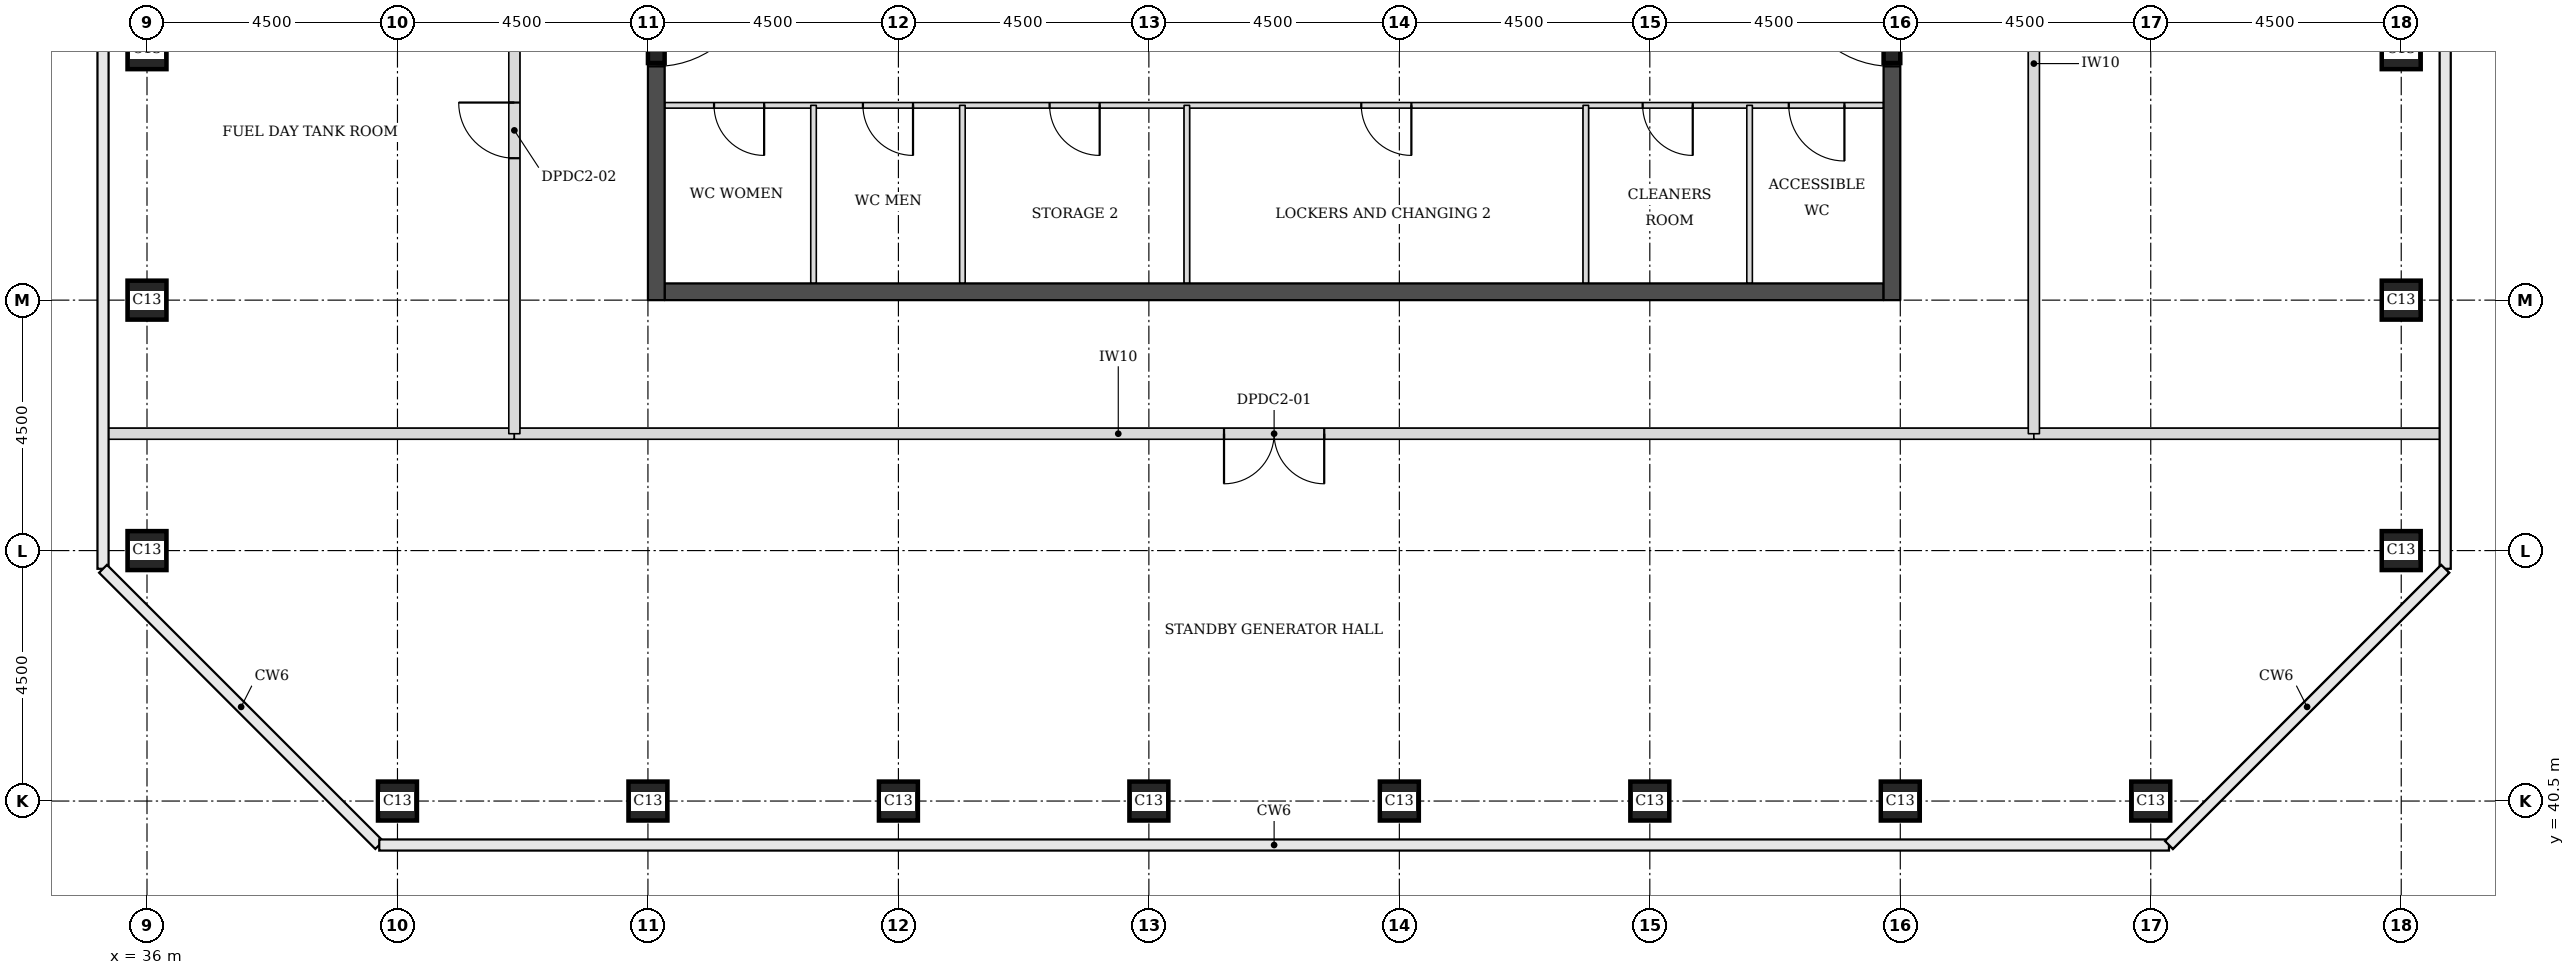
"""IFC4 building model, lengths in metres.
Left out: names, types, materials, properties, quantities, classifications, styles, units other than length and angle.
Written with IfcOpenShell. Run it as: python <this file> out.ifc"""

import sys

from ifc_helpers import new_model, si_unit, direction, frame, frame_2d, origin, origin_2d, place, context, subcontext, project, spatial, rectangle, extrude, element, fill, save


model = new_model("IFC4")
c1 = context("Model", 3, precision=1e-05, world=origin(), true_north=direction((0.0, 1.0)))
c2 = subcontext(c1, "Body", "Model", "MODEL_VIEW")
j1 = project(units=[si_unit("LENGTHUNIT", "METRE"), si_unit("PLANEANGLEUNIT", "RADIAN")], contexts=[c1])
p1 = place(None, origin())
s1 = spatial("IfcSite", under=j1, at=p1, CompositionType="ELEMENT")
p2 = place(p1, origin())
s2 = spatial("IfcBuilding", under=s1, at=p2, CompositionType="ELEMENT")
p3 = place(p2, frame((0.0, 0.0, 268.7)))
s3 = spatial("IfcBuildingStorey", under=s2, at=p3, CompositionType="ELEMENT", Elevation=268.7)
for number, where, z_axis, x_axis in (
    (1, (40.5, 40.5, 0.0), (0.0, 0.0, 1.0), (1.0, 0.0, 0.0)),
    (2, (45.0, 40.5, 0.0), (0.0, 0.0, 1.0), (1.0, 0.0, 0.0)),
    (3, (49.5, 40.5, 0.0), (0.0, 0.0, 1.0), (1.0, 0.0, 0.0)),
    (4, (54.0, 40.5, 0.0), (0.0, 0.0, 1.0), (1.0, 0.0, 0.0)),
    (5, (58.5, 40.5, 0.0), (0.0, 0.0, 1.0), (1.0, 0.0, 0.0)),
    (6, (63.0, 40.5, 0.0), (0.0, 0.0, 1.0), (1.0, 0.0, 0.0)),
    (7, (67.5, 40.5, 0.0), (0.0, 0.0, 1.0), (1.0, 0.0, 0.0)),
    (8, (72.0, 40.5, 0.0), (0.0, 0.0, 1.0), (1.0, 0.0, 0.0)),
    (9, (36.0, 45.0, 0.0), (0.0, 0.0, 1.0), (1.0, 0.0, 0.0)),
    (10, (76.5, 45.0, 0.0), (0.0, 0.0, 1.0), (1.0, 0.0, 0.0)),
    (11, (36.0, 49.5, 0.0), (0.0, 0.0, 1.0), (1.0, 0.0, 0.0)),
    (12, (76.5, 49.5, 0.0), (0.0, 0.0, 1.0), (1.0, 0.0, 0.0)),
    (13, (36.0, 54.0, 0.0), (0.0, 0.0, 1.0), (1.0, 0.0, 0.0)),
    (14, (76.5, 54.0, 0.0), (0.0, 0.0, 1.0), (1.0, 0.0, 0.0)),
):
    element("IfcColumn", number, at=place(p3, frame(where, z_axis=z_axis, x_axis=x_axis)), inside=s3, PredefinedType="COLUMN", context=c2, shape_type="SweptSolid", body=[
        extrude(rectangle(XDim=0.7, YDim=0.7, at=origin_2d()), origin(), (0.0, 0.0, 1.0), 5.0),
    ])
p4 = place(p3, frame((45.3, 49.65, 0.0), z_axis=(0.0, 0.0, 1.0), x_axis=(1.0, 0.0, 0.0)))
e15 = element("IfcWall", 15, at=p4, inside=s3, PredefinedType="SHEAR", context=c2, shape_type="SweptSolid", body=[
    extrude(rectangle(XDim=21.9, YDim=0.3, at=frame_2d((10.95, 0.0))), origin(), (0.0, 0.0, 1.0), 5.0),
])
p5 = place(p3, frame((45.15, 49.5, 0.0), z_axis=(0.0, 0.0, 1.0), x_axis=(0.0, 1.0, 0.0)))
e16 = element("IfcWall", 16, at=p5, inside=s3, PredefinedType="SHEAR", context=c2, shape_type="SweptSolid", body=[
    extrude(rectangle(XDim=22.5, YDim=0.3, at=frame_2d((11.25, 0.0))), origin(), (0.0, 0.0, 1.0), 5.0),
])
p6 = place(p5, frame((4.2, 0.0, 0.0)))
e17 = element("IfcOpeningElement", 17, at=p6, cuts=e16, PredefinedType="OPENING", context=c2, shape_type="SweptSolid", body=[
    extrude(rectangle(XDim=1.8, YDim=2.1, at=frame_2d((0.9, 1.05))), frame((0.0, 0.16, 0.0), z_axis=(0.0, -1.0, 0.0), x_axis=(1.0, 0.0, 0.0)), (0.0, 0.0, 1.0), 0.32),
])
p7 = place(p5, frame((6.9, 0.0, 0.0)))
e18 = element("IfcOpeningElement", 18, at=p7, cuts=e16, PredefinedType="OPENING", context=c2, shape_type="SweptSolid", body=[
    extrude(rectangle(XDim=1.1, YDim=2.1, at=frame_2d((0.55, 1.05))), frame((0.0, 0.16, 0.0), z_axis=(0.0, -1.0, 0.0), x_axis=(1.0, 0.0, 0.0)), (0.0, 0.0, 1.0), 0.32),
])
p8 = place(p5, frame((13.6, 0.0, 0.0)))
e19 = element("IfcOpeningElement", 19, at=p8, cuts=e16, PredefinedType="OPENING", context=c2, shape_type="SweptSolid", body=[
    extrude(rectangle(XDim=1.1, YDim=2.1, at=frame_2d((0.55, 1.05))), frame((0.0, 0.16, 0.0), z_axis=(0.0, -1.0, 0.0), x_axis=(1.0, 0.0, 0.0)), (0.0, 0.0, 1.0), 0.32),
])
p9 = place(p5, frame((16.5, 0.0, 0.0)))
e20 = element("IfcOpeningElement", 20, at=p9, cuts=e16, PredefinedType="OPENING", context=c2, shape_type="SweptSolid", body=[
    extrude(rectangle(XDim=1.8, YDim=2.1, at=frame_2d((0.9, 1.05))), frame((0.0, 0.16, 0.0), z_axis=(0.0, -1.0, 0.0), x_axis=(1.0, 0.0, 0.0)), (0.0, 0.0, 1.0), 0.32),
])
p10 = place(p3, frame((67.35, 49.5, 0.0), z_axis=(0.0, 0.0, 1.0), x_axis=(0.0, 1.0, 0.0)))
e21 = element("IfcWall", 21, at=p10, inside=s3, PredefinedType="SHEAR", context=c2, shape_type="SweptSolid", body=[
    extrude(rectangle(XDim=22.5, YDim=0.3, at=frame_2d((11.25, 0.0))), origin(), (0.0, 0.0, 1.0), 5.0),
])
p11 = place(p10, frame((4.2, 0.0, 0.0)))
e22 = element("IfcOpeningElement", 22, at=p11, cuts=e21, PredefinedType="OPENING", context=c2, shape_type="SweptSolid", body=[
    extrude(rectangle(XDim=1.8, YDim=2.1, at=frame_2d((0.9, 1.05))), frame((0.0, 0.16, 0.0), z_axis=(0.0, -1.0, 0.0), x_axis=(1.0, 0.0, 0.0)), (0.0, 0.0, 1.0), 0.32),
])
p12 = place(p10, frame((6.9, 0.0, 0.0)))
e23 = element("IfcOpeningElement", 23, at=p12, cuts=e21, PredefinedType="OPENING", context=c2, shape_type="SweptSolid", body=[
    extrude(rectangle(XDim=1.1, YDim=2.1, at=frame_2d((0.55, 1.05))), frame((0.0, 0.16, 0.0), z_axis=(0.0, -1.0, 0.0), x_axis=(1.0, 0.0, 0.0)), (0.0, 0.0, 1.0), 0.32),
])
p13 = place(p10, frame((13.6, 0.0, 0.0)))
e24 = element("IfcOpeningElement", 24, at=p13, cuts=e21, PredefinedType="OPENING", context=c2, shape_type="SweptSolid", body=[
    extrude(rectangle(XDim=1.1, YDim=2.1, at=frame_2d((0.55, 1.05))), frame((0.0, 0.16, 0.0), z_axis=(0.0, -1.0, 0.0), x_axis=(1.0, 0.0, 0.0)), (0.0, 0.0, 1.0), 0.32),
])
p14 = place(p10, frame((16.5, 0.0, 0.0)))
e25 = element("IfcOpeningElement", 25, at=p14, cuts=e21, PredefinedType="OPENING", context=c2, shape_type="SweptSolid", body=[
    extrude(rectangle(XDim=1.8, YDim=2.1, at=frame_2d((0.9, 1.05))), frame((0.0, 0.16, 0.0), z_axis=(0.0, -1.0, 0.0), x_axis=(1.0, 0.0, 0.0)), (0.0, 0.0, 1.0), 0.32),
])
p15 = place(p3, frame((35.3, 47.1, 0.0), z_axis=(0.0, 0.0, 1.0), x_axis=(1.0, 0.0, 0.0)))
e26 = element("IfcWall", 26, at=p15, inside=s3, PredefinedType="PARTITIONING", context=c2, shape_type="SweptSolid", body=[
    extrude(rectangle(XDim=7.3, YDim=0.2, at=frame_2d((3.65, 0.0))), origin(), (0.0, 0.0, 1.0), 4.75),
])
p16 = place(p3, frame((42.6, 47.1, 0.0), z_axis=(0.0, 0.0, 1.0), x_axis=(1.0, 0.0, 0.0)))
e27 = element("IfcWall", 27, at=p16, inside=s3, PredefinedType="PARTITIONING", context=c2, shape_type="SweptSolid", body=[
    extrude(rectangle(XDim=27.3, YDim=0.2, at=frame_2d((13.65, 0.0))), origin(), (0.0, 0.0, 1.0), 4.75),
])
p17 = place(p16, frame((12.75, 0.0, 0.0)))
e28 = element("IfcOpeningElement", 28, at=p17, cuts=e27, PredefinedType="OPENING", context=c2, shape_type="SweptSolid", body=[
    extrude(rectangle(XDim=1.8, YDim=2.1, at=frame_2d((0.9, 1.05))), frame((0.0, 0.11, 0.0), z_axis=(0.0, -1.0, 0.0), x_axis=(1.0, 0.0, 0.0)), (0.0, 0.0, 1.0), 0.22),
])
p18 = place(p3, frame((42.6, 47.1, 0.0), z_axis=(0.0, 0.0, 1.0), x_axis=(0.0, 1.0, 0.0)))
e29 = element("IfcWall", 29, at=p18, inside=s3, PredefinedType="PARTITIONING", context=c2, shape_type="SweptSolid", body=[
    extrude(rectangle(XDim=10.9, YDim=0.2, at=frame_2d((5.45, 0.0))), origin(), (0.0, 0.0, 1.0), 4.75),
])
p19 = place(p18, frame((4.95, 0.0, 0.0)))
e30 = element("IfcOpeningElement", 30, at=p19, cuts=e29, PredefinedType="OPENING", context=c2, shape_type="SweptSolid", body=[
    extrude(rectangle(XDim=1.0, YDim=2.1, at=frame_2d((0.5, 1.05))), frame((0.0, 0.11, 0.0), z_axis=(0.0, -1.0, 0.0), x_axis=(1.0, 0.0, 0.0)), (0.0, 0.0, 1.0), 0.22),
])
p20 = place(p3, frame((69.9, 47.1, 0.0), z_axis=(0.0, 0.0, 1.0), x_axis=(1.0, 0.0, 0.0)))
e31 = element("IfcWall", 31, at=p20, inside=s3, PredefinedType="PARTITIONING", context=c2, shape_type="SweptSolid", body=[
    extrude(rectangle(XDim=7.3, YDim=0.2, at=frame_2d((3.65, 0.0))), origin(), (0.0, 0.0, 1.0), 4.75),
])
p21 = place(p3, frame((69.9, 47.1, 0.0), z_axis=(0.0, 0.0, 1.0), x_axis=(0.0, 1.0, 0.0)))
e32 = element("IfcWall", 32, at=p21, inside=s3, PredefinedType="PARTITIONING", context=c2, shape_type="SweptSolid", body=[
    extrude(rectangle(XDim=18.9, YDim=0.2, at=frame_2d((9.45, 0.0))), origin(), (0.0, 0.0, 1.0), 4.75),
])
p22 = place(p21, frame((8.55, 0.0, 0.0)))
e33 = element("IfcOpeningElement", 33, at=p22, cuts=e32, PredefinedType="OPENING", context=c2, shape_type="SweptSolid", body=[
    extrude(rectangle(XDim=1.8, YDim=2.1, at=frame_2d((0.9, 1.05))), frame((0.0, 0.11, 0.0), z_axis=(0.0, -1.0, 0.0), x_axis=(1.0, 0.0, 0.0)), (0.0, 0.0, 1.0), 0.22),
])
p23 = place(p3, frame((45.3, 53.0, 0.0), z_axis=(0.0, 0.0, 1.0), x_axis=(1.0, 0.0, 0.0)))
e34 = element("IfcWall", 34, at=p23, inside=s3, PredefinedType="PARTITIONING", context=c2, shape_type="SweptSolid", body=[
    extrude(rectangle(XDim=21.9, YDim=0.1, at=frame_2d((10.95, 0.0))), origin(), (0.0, 0.0, 1.0), 4.75),
])
p24 = place(p23, frame((20.196, 0.0, 0.0)))
e35 = element("IfcOpeningElement", 35, at=p24, cuts=e34, PredefinedType="OPENING", context=c2, shape_type="SweptSolid", body=[
    extrude(rectangle(XDim=1.0, YDim=2.1, at=frame_2d((0.5, 1.05))), frame((0.0, 0.06, 0.0), z_axis=(0.0, -1.0, 0.0), x_axis=(1.0, 0.0, 0.0)), (0.0, 0.0, 1.0), 0.12),
])
p25 = place(p23, frame((17.571, 0.0, 0.0)))
e36 = element("IfcOpeningElement", 36, at=p25, cuts=e34, PredefinedType="OPENING", context=c2, shape_type="SweptSolid", body=[
    extrude(rectangle(XDim=0.9, YDim=2.1, at=frame_2d((0.45, 1.05))), frame((0.0, 0.06, 0.0), z_axis=(0.0, -1.0, 0.0), x_axis=(1.0, 0.0, 0.0)), (0.0, 0.0, 1.0), 0.12),
])
p26 = place(p23, frame((0.887, 0.0, 0.0)))
e37 = element("IfcOpeningElement", 37, at=p26, cuts=e34, PredefinedType="OPENING", context=c2, shape_type="SweptSolid", body=[
    extrude(rectangle(XDim=0.9, YDim=2.1, at=frame_2d((0.45, 1.05))), frame((0.0, 0.06, 0.0), z_axis=(0.0, -1.0, 0.0), x_axis=(1.0, 0.0, 0.0)), (0.0, 0.0, 1.0), 0.12),
])
p27 = place(p23, frame((3.562, 0.0, 0.0)))
e38 = element("IfcOpeningElement", 38, at=p27, cuts=e34, PredefinedType="OPENING", context=c2, shape_type="SweptSolid", body=[
    extrude(rectangle(XDim=0.9, YDim=2.1, at=frame_2d((0.45, 1.05))), frame((0.0, 0.06, 0.0), z_axis=(0.0, -1.0, 0.0), x_axis=(1.0, 0.0, 0.0)), (0.0, 0.0, 1.0), 0.12),
])
p28 = place(p23, frame((6.916, 0.0, 0.0)))
e39 = element("IfcOpeningElement", 39, at=p28, cuts=e34, PredefinedType="OPENING", context=c2, shape_type="SweptSolid", body=[
    extrude(rectangle(XDim=0.9, YDim=2.1, at=frame_2d((0.45, 1.05))), frame((0.0, 0.06, 0.0), z_axis=(0.0, -1.0, 0.0), x_axis=(1.0, 0.0, 0.0)), (0.0, 0.0, 1.0), 0.12),
])
p29 = place(p23, frame((12.516, 0.0, 0.0)))
e40 = element("IfcOpeningElement", 40, at=p29, cuts=e34, PredefinedType="OPENING", context=c2, shape_type="SweptSolid", body=[
    extrude(rectangle(XDim=0.9, YDim=2.1, at=frame_2d((0.45, 1.05))), frame((0.0, 0.06, 0.0), z_axis=(0.0, -1.0, 0.0), x_axis=(1.0, 0.0, 0.0)), (0.0, 0.0, 1.0), 0.12),
])
for number, where, z_axis, x_axis in (
    (41, (47.975, 49.8, 0.0), (0.0, 0.0, 1.0), (0.0, 1.0, 0.0)),
    (42, (50.65, 49.8, 0.0), (0.0, 0.0, 1.0), (0.0, 1.0, 0.0)),
    (43, (54.682, 49.8, 0.0), (0.0, 0.0, 1.0), (0.0, 1.0, 0.0)),
    (44, (61.85, 49.8, 0.0), (0.0, 0.0, 1.0), (0.0, 1.0, 0.0)),
    (45, (64.792, 49.8, 0.0), (0.0, 0.0, 1.0), (0.0, 1.0, 0.0)),
):
    element("IfcWall", number, at=place(p3, frame(where, z_axis=z_axis, x_axis=x_axis)), inside=s3, PredefinedType="PARTITIONING", context=c2, shape_type="SweptSolid", body=[
        extrude(rectangle(XDim=3.2, YDim=0.1, at=frame_2d((1.6, 0.0))), origin(), (0.0, 0.0, 1.0), 4.75),
    ])
p30 = place(p17, frame((1.8, 0.0, 0.0), z_axis=(0.0, 0.0, 1.0), x_axis=(-1.0, 0.0, 0.0)))
e46 = element("IfcDoor", 46, at=p30, inside=s3, OperationType="DOUBLE_DOOR_SINGLE_SWING", PredefinedType="DOOR", context=c2, shape_type="SweptSolid", body=[
    extrude(rectangle(XDim=1.8, YDim=2.1, at=frame_2d((0.9, 1.05))), frame((0.0, 0.025, 0.0), z_axis=(0.0, -1.0, 0.0), x_axis=(1.0, 0.0, 0.0)), (0.0, 0.0, 1.0), 0.05),
])
fill(e28, e46)
p31 = place(p19, origin())
e47 = element("IfcDoor", 47, at=p31, inside=s3, OperationType="SINGLE_SWING_RIGHT", PredefinedType="DOOR", context=c2, shape_type="SweptSolid", body=[
    extrude(rectangle(XDim=1.0, YDim=2.1, at=frame_2d((0.5, 1.05))), frame((0.0, 0.025, 0.0), z_axis=(0.0, -1.0, 0.0), x_axis=(1.0, 0.0, 0.0)), (0.0, 0.0, 1.0), 0.05),
])
fill(e30, e47)
p32 = place(p6, frame((1.8, 0.0, 0.0), z_axis=(0.0, 0.0, 1.0), x_axis=(-1.0, 0.0, 0.0)))
e48 = element("IfcDoor", 48, at=p32, inside=s3, OperationType="SINGLE_SWING_LEFT", PredefinedType="DOOR", context=c2, shape_type="SweptSolid", body=[
    extrude(rectangle(XDim=1.8, YDim=2.1, at=frame_2d((0.9, 1.05))), frame((0.0, 0.025, 0.0), z_axis=(0.0, -1.0, 0.0), x_axis=(1.0, 0.0, 0.0)), (0.0, 0.0, 1.0), 0.05),
])
fill(e17, e48)
p33 = place(p11, origin())
e49 = element("IfcDoor", 49, at=p33, inside=s3, OperationType="SINGLE_SWING_RIGHT", PredefinedType="DOOR", context=c2, shape_type="SweptSolid", body=[
    extrude(rectangle(XDim=1.8, YDim=2.1, at=frame_2d((0.9, 1.05))), frame((0.0, 0.025, 0.0), z_axis=(0.0, -1.0, 0.0), x_axis=(1.0, 0.0, 0.0)), (0.0, 0.0, 1.0), 0.05),
])
fill(e22, e49)
p34 = place(p24, frame((1.0, 0.0, 0.0), z_axis=(0.0, 0.0, 1.0), x_axis=(-1.0, 0.0, 0.0)))
e50 = element("IfcDoor", 50, at=p34, inside=s3, OperationType="SINGLE_SWING_LEFT", PredefinedType="DOOR", context=c2, shape_type="SweptSolid", body=[
    extrude(rectangle(XDim=1.0, YDim=2.1, at=frame_2d((0.5, 1.05))), frame((0.0, 0.025, 0.0), z_axis=(0.0, -1.0, 0.0), x_axis=(1.0, 0.0, 0.0)), (0.0, 0.0, 1.0), 0.05),
])
fill(e35, e50)
p35 = place(p25, frame((0.9, 0.0, 0.0), z_axis=(0.0, 0.0, 1.0), x_axis=(-1.0, 0.0, 0.0)))
e51 = element("IfcDoor", 51, at=p35, inside=s3, OperationType="SINGLE_SWING_LEFT", PredefinedType="DOOR", context=c2, shape_type="SweptSolid", body=[
    extrude(rectangle(XDim=0.9, YDim=2.1, at=frame_2d((0.45, 1.05))), frame((0.0, 0.025, 0.0), z_axis=(0.0, -1.0, 0.0), x_axis=(1.0, 0.0, 0.0)), (0.0, 0.0, 1.0), 0.05),
])
fill(e36, e51)
p36 = place(p26, frame((0.9, 0.0, 0.0), z_axis=(0.0, 0.0, 1.0), x_axis=(-1.0, 0.0, 0.0)))
e52 = element("IfcDoor", 52, at=p36, inside=s3, OperationType="SINGLE_SWING_LEFT", PredefinedType="DOOR", context=c2, shape_type="SweptSolid", body=[
    extrude(rectangle(XDim=0.9, YDim=2.1, at=frame_2d((0.45, 1.05))), frame((0.0, 0.025, 0.0), z_axis=(0.0, -1.0, 0.0), x_axis=(1.0, 0.0, 0.0)), (0.0, 0.0, 1.0), 0.05),
])
fill(e37, e52)
p37 = place(p27, frame((0.9, 0.0, 0.0), z_axis=(0.0, 0.0, 1.0), x_axis=(-1.0, 0.0, 0.0)))
e53 = element("IfcDoor", 53, at=p37, inside=s3, OperationType="SINGLE_SWING_LEFT", PredefinedType="DOOR", context=c2, shape_type="SweptSolid", body=[
    extrude(rectangle(XDim=0.9, YDim=2.1, at=frame_2d((0.45, 1.05))), frame((0.0, 0.025, 0.0), z_axis=(0.0, -1.0, 0.0), x_axis=(1.0, 0.0, 0.0)), (0.0, 0.0, 1.0), 0.05),
])
fill(e38, e53)
p38 = place(p28, frame((0.9, 0.0, 0.0), z_axis=(0.0, 0.0, 1.0), x_axis=(-1.0, 0.0, 0.0)))
e54 = element("IfcDoor", 54, at=p38, inside=s3, OperationType="SINGLE_SWING_LEFT", PredefinedType="DOOR", context=c2, shape_type="SweptSolid", body=[
    extrude(rectangle(XDim=0.9, YDim=2.1, at=frame_2d((0.45, 1.05))), frame((0.0, 0.025, 0.0), z_axis=(0.0, -1.0, 0.0), x_axis=(1.0, 0.0, 0.0)), (0.0, 0.0, 1.0), 0.05),
])
fill(e39, e54)
p39 = place(p29, frame((0.9, 0.0, 0.0), z_axis=(0.0, 0.0, 1.0), x_axis=(-1.0, 0.0, 0.0)))
e55 = element("IfcDoor", 55, at=p39, inside=s3, OperationType="SINGLE_SWING_LEFT", PredefinedType="DOOR", context=c2, shape_type="SweptSolid", body=[
    extrude(rectangle(XDim=0.9, YDim=2.1, at=frame_2d((0.45, 1.05))), frame((0.0, 0.025, 0.0), z_axis=(0.0, -1.0, 0.0), x_axis=(1.0, 0.0, 0.0)), (0.0, 0.0, 1.0), 0.05),
])
fill(e40, e55)
save(model, sys.argv[1])
